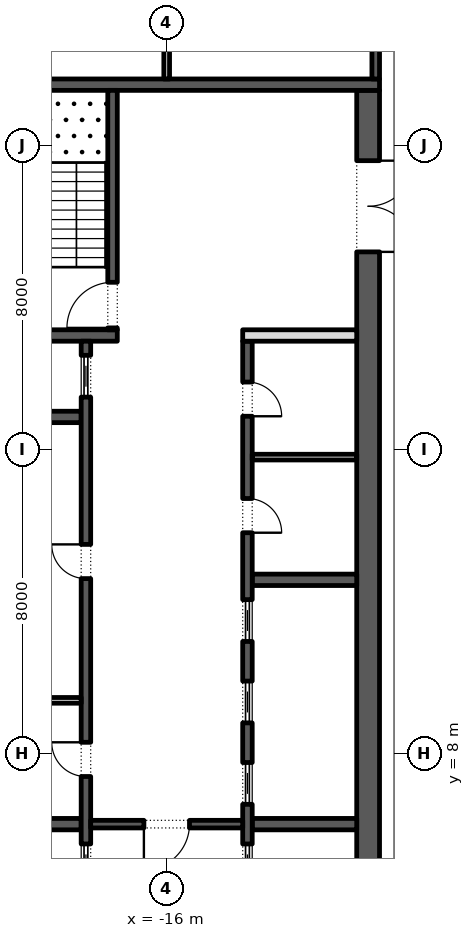
"""IFC4 building model, lengths in metres.
Left out: names, types, materials, properties, quantities, classifications, styles, units other than length and angle.
Written with IfcOpenShell. Run it as: python <this file> out.ifc"""

import sys

from ifc_helpers import new_model, si_unit, direction, frame, frame_2d, origin, place, context, subcontext, project, spatial, rectangle, extrude, element, fill, save


model = new_model("IFC4")
c1 = context("Model", 3, precision=1e-05, world=origin(), true_north=direction((0.0, 1.0)))
c2 = subcontext(c1, "Body", "Model", "MODEL_VIEW")
j1 = project(units=[si_unit("LENGTHUNIT", "METRE"), si_unit("PLANEANGLEUNIT", "RADIAN")], contexts=[c1])
p1 = place(None, origin())
s1 = spatial("IfcSite", under=j1, at=p1, CompositionType="ELEMENT")
p2 = place(p1, origin())
s2 = spatial("IfcBuilding", under=s1, at=p2, CompositionType="ELEMENT")
p3 = place(p2, frame((0.0, 0.0, 268.2)))
s3 = spatial("IfcBuildingStorey", under=s2, at=p3, CompositionType="ELEMENT", Elevation=268.2)
p4 = place(p3, frame((-10.7, -2.45, 0.0), z_axis=(0.0, 0.0, 1.0), x_axis=(0.0, 1.0, 0.0)))
e1 = element("IfcWall", 1, at=p4, inside=s3, PredefinedType="SHEAR", context=c2, shape_type="SweptSolid", body=[
    extrude(rectangle(XDim=27.9, YDim=0.6, at=frame_2d((13.95, 0.0))), origin(), (0.0, 0.0, 1.0), 4.0),
])
p5 = place(p4, frame((23.65, 0.0, 0.0)))
e2 = element("IfcOpeningElement", 2, at=p5, cuts=e1, PredefinedType="OPENING", context=c2, shape_type="SweptSolid", body=[
    extrude(rectangle(XDim=2.4, YDim=2.1, at=frame_2d((1.2, 1.05))), frame((0.0, 0.31, 0.0), z_axis=(0.0, -1.0, 0.0), x_axis=(1.0, 0.0, 0.0)), (0.0, 0.0, 1.0), 0.62),
])
p6 = place(p4, frame((1.087, 0.0, 0.0)))
e3 = element("IfcOpeningElement", 3, at=p6, cuts=e1, PredefinedType="OPENING", context=c2, shape_type="SweptSolid", body=[
    extrude(rectangle(XDim=0.9, YDim=2.1, at=frame_2d((0.45, 1.05))), frame((0.0, 0.31, 0.0), z_axis=(0.0, -1.0, 0.0), x_axis=(1.0, 0.0, 0.0)), (0.0, 0.0, 1.0), 0.62),
])
p7 = place(p4, frame((4.262, 0.0, 0.0)))
e4 = element("IfcOpeningElement", 4, at=p7, cuts=e1, PredefinedType="OPENING", context=c2, shape_type="SweptSolid", body=[
    extrude(rectangle(XDim=1.0, YDim=2.1, at=frame_2d((0.5, 1.05))), frame((0.0, 0.31, 0.0), z_axis=(0.0, -1.0, 0.0), x_axis=(1.0, 0.0, 0.0)), (0.0, 0.0, 1.0), 0.62),
])
p8 = place(p3, frame((-21.6, 25.6, 0.0), z_axis=(0.0, 0.0, 1.0), x_axis=(1.0, 0.0, 0.0)))
e5 = element("IfcWall", 5, at=p8, inside=s3, PredefinedType="SHEAR", context=c2, shape_type="SweptSolid", body=[
    extrude(rectangle(XDim=11.2, YDim=0.3, at=frame_2d((5.6, 0.0))), origin(), (0.0, 0.0, 1.0), 4.0),
])
p9 = place(p3, frame((-21.0, 19.0, 0.0), z_axis=(0.0, 0.0, 1.0), x_axis=(1.0, 0.0, 0.0)))
e6 = element("IfcWall", 6, at=p9, inside=s3, PredefinedType="SHEAR", context=c2, shape_type="SweptSolid", body=[
    extrude(rectangle(XDim=3.7, YDim=0.3, at=frame_2d((1.85, 0.0))), origin(), (0.0, 0.0, 1.0), 4.0),
])
p10 = place(p3, frame((-17.425, 19.15, 0.0), z_axis=(0.0, 0.0, 1.0), x_axis=(0.0, 1.0, 0.0)))
e7 = element("IfcWall", 7, at=p10, inside=s3, PredefinedType="SHEAR", context=c2, shape_type="SweptSolid", body=[
    extrude(rectangle(XDim=6.3, YDim=0.25, at=frame_2d((3.15, 0.0))), origin(), (0.0, 0.0, 1.0), 4.0),
])
p11 = place(p10, frame((0.05, 0.0, 0.0)))
e8 = element("IfcOpeningElement", 8, at=p11, cuts=e7, PredefinedType="OPENING", context=c2, shape_type="SweptSolid", body=[
    extrude(rectangle(XDim=1.2, YDim=2.1, at=frame_2d((0.6, 1.05))), frame((0.0, 0.135, 0.0), z_axis=(0.0, -1.0, 0.0), x_axis=(1.0, 0.0, 0.0)), (0.0, 0.0, 1.0), 0.27),
])
for number, where, z_axis, x_axis in (
    (9, (-21.0, 6.143, 0.0), (0.0, 0.0, 1.0), (1.0, 0.0, 0.0)),
    (10, (-21.0, 16.857, 0.0), (0.0, 0.0, 1.0), (1.0, 0.0, 0.0)),
):
    element("IfcWall", number, at=place(p3, frame(where, z_axis=z_axis, x_axis=x_axis)), inside=s3, PredefinedType="SHEAR", context=c2, shape_type="SweptSolid", body=[
        extrude(rectangle(XDim=2.75, YDim=0.3, at=frame_2d((1.375, 0.0))), origin(), (0.0, 0.0, 1.0), 4.0),
    ])
p12 = place(p3, frame((-18.125, 4.15, 0.0), z_axis=(0.0, 0.0, 1.0), x_axis=(0.0, 1.0, 0.0)))
e11 = element("IfcWall", 11, at=p12, inside=s3, PredefinedType="SHEAR", context=c2, shape_type="SweptSolid", body=[
    extrude(rectangle(XDim=14.7, YDim=0.25, at=frame_2d((7.35, 0.0))), origin(), (0.0, 0.0, 1.0), 4.0),
])
p13 = place(p12, frame((3.246, 0.0, 0.0)))
e12 = element("IfcOpeningElement", 12, at=p13, cuts=e11, PredefinedType="OPENING", context=c2, shape_type="SweptSolid", body=[
    extrude(rectangle(XDim=0.9, YDim=2.1, at=frame_2d((0.45, 1.05))), frame((0.0, 0.135, 0.0), z_axis=(0.0, -1.0, 0.0), x_axis=(1.0, 0.0, 0.0)), (0.0, 0.0, 1.0), 0.27),
])
p14 = place(p12, frame((8.454, 0.0, 0.0)))
e13 = element("IfcOpeningElement", 13, at=p14, cuts=e11, PredefinedType="OPENING", context=c2, shape_type="SweptSolid", body=[
    extrude(rectangle(XDim=0.9, YDim=2.1, at=frame_2d((0.45, 1.05))), frame((0.0, 0.135, 0.0), z_axis=(0.0, -1.0, 0.0), x_axis=(1.0, 0.0, 0.0)), (0.0, 0.0, 1.0), 0.27),
])
p15 = place(p12, frame((0.371, 0.0, 0.0)))
e14 = element("IfcOpeningElement", 14, at=p15, cuts=e11, PredefinedType="OPENING", context=c2, shape_type="SweptSolid", body=[
    extrude(rectangle(XDim=1.1, YDim=2.1, at=frame_2d((0.55, 1.05))), frame((0.0, 0.135, 0.0), z_axis=(0.0, -1.0, 0.0), x_axis=(1.0, 0.0, 0.0)), (0.0, 0.0, 1.0), 0.27),
])
p16 = place(p12, frame((13.229, 0.0, 0.0)))
e15 = element("IfcOpeningElement", 15, at=p16, cuts=e11, PredefinedType="OPENING", context=c2, shape_type="SweptSolid", body=[
    extrude(rectangle(XDim=1.1, YDim=2.1, at=frame_2d((0.55, 1.05))), frame((0.0, 0.135, 0.0), z_axis=(0.0, -1.0, 0.0), x_axis=(1.0, 0.0, 0.0)), (0.0, 0.0, 1.0), 0.27),
])
p17 = place(p3, frame((-21.0, 9.4, 0.0), z_axis=(0.0, 0.0, 1.0), x_axis=(1.0, 0.0, 0.0)))
e16 = element("IfcWall", 16, at=p17, inside=s3, PredefinedType="PARTITIONING", context=c2, shape_type="SweptSolid", body=[
    extrude(rectangle(XDim=2.75, YDim=0.15, at=frame_2d((1.375, 0.0))), origin(), (0.0, 0.0, 1.0), 4.0),
])
for number, where, z_axis, x_axis in (
    (17, (-13.75, 6.143, 0.0), (0.0, 0.0, 1.0), (1.0, 0.0, 0.0)),
    (18, (-13.75, 12.571, 0.0), (0.0, 0.0, 1.0), (1.0, 0.0, 0.0)),
):
    element("IfcWall", number, at=place(p3, frame(where, z_axis=z_axis, x_axis=x_axis)), inside=s3, PredefinedType="SHEAR", context=c2, shape_type="SweptSolid", body=[
        extrude(rectangle(XDim=2.75, YDim=0.3, at=frame_2d((1.375, 0.0))), origin(), (0.0, 0.0, 1.0), 4.0),
    ])
p18 = place(p3, frame((-13.875, -2.45, 0.0), z_axis=(0.0, 0.0, 1.0), x_axis=(0.0, 1.0, 0.0)))
e19 = element("IfcWall", 19, at=p18, inside=s3, PredefinedType="SHEAR", context=c2, shape_type="SweptSolid", body=[
    extrude(rectangle(XDim=21.3, YDim=0.25, at=frame_2d((10.65, 0.0))), origin(), (0.0, 0.0, 1.0), 4.0),
])
p19 = place(p18, frame((16.261, 0.0, 0.0)))
e20 = element("IfcOpeningElement", 20, at=p19, cuts=e19, PredefinedType="OPENING", context=c2, shape_type="SweptSolid", body=[
    extrude(rectangle(XDim=0.9, YDim=2.1, at=frame_2d((0.45, 1.05))), frame((0.0, 0.135, 0.0), z_axis=(0.0, -1.0, 0.0), x_axis=(1.0, 0.0, 0.0)), (0.0, 0.0, 1.0), 0.27),
])
p20 = place(p18, frame((19.325, 0.0, 0.0)))
e21 = element("IfcOpeningElement", 21, at=p20, cuts=e19, PredefinedType="OPENING", context=c2, shape_type="SweptSolid", body=[
    extrude(rectangle(XDim=0.9, YDim=2.1, at=frame_2d((0.45, 1.05))), frame((0.0, 0.135, 0.0), z_axis=(0.0, -1.0, 0.0), x_axis=(1.0, 0.0, 0.0)), (0.0, 0.0, 1.0), 0.27),
])
p21 = place(p18, frame((6.971, 0.0, 0.0)))
e22 = element("IfcOpeningElement", 22, at=p21, cuts=e19, PredefinedType="OPENING", context=c2, shape_type="SweptSolid", body=[
    extrude(rectangle(XDim=1.1, YDim=2.1, at=frame_2d((0.55, 1.05))), frame((0.0, 0.135, 0.0), z_axis=(0.0, -1.0, 0.0), x_axis=(1.0, 0.0, 0.0)), (0.0, 0.0, 1.0), 0.27),
])
p22 = place(p18, frame((9.114, 0.0, 0.0)))
e23 = element("IfcOpeningElement", 23, at=p22, cuts=e19, PredefinedType="OPENING", context=c2, shape_type="SweptSolid", body=[
    extrude(rectangle(XDim=1.1, YDim=2.1, at=frame_2d((0.55, 1.05))), frame((0.0, 0.135, 0.0), z_axis=(0.0, -1.0, 0.0), x_axis=(1.0, 0.0, 0.0)), (0.0, 0.0, 1.0), 0.27),
])
p23 = place(p18, frame((11.257, 0.0, 0.0)))
e24 = element("IfcOpeningElement", 24, at=p23, cuts=e19, PredefinedType="OPENING", context=c2, shape_type="SweptSolid", body=[
    extrude(rectangle(XDim=1.1, YDim=2.1, at=frame_2d((0.55, 1.05))), frame((0.0, 0.135, 0.0), z_axis=(0.0, -1.0, 0.0), x_axis=(1.0, 0.0, 0.0)), (0.0, 0.0, 1.0), 0.27),
])
p24 = place(p18, frame((13.4, 0.0, 0.0)))
e25 = element("IfcOpeningElement", 25, at=p24, cuts=e19, PredefinedType="OPENING", context=c2, shape_type="SweptSolid", body=[
    extrude(rectangle(XDim=1.1, YDim=2.1, at=frame_2d((0.55, 1.05))), frame((0.0, 0.135, 0.0), z_axis=(0.0, -1.0, 0.0), x_axis=(1.0, 0.0, 0.0)), (0.0, 0.0, 1.0), 0.27),
])
p25 = place(p3, frame((-14.0, 19.0, 0.0), z_axis=(0.0, 0.0, 1.0), x_axis=(1.0, 0.0, 0.0)))
e26 = element("IfcWall", 26, at=p25, inside=s3, PredefinedType="PARTITIONING", context=c2, shape_type="SweptSolid", body=[
    extrude(rectangle(XDim=3.0, YDim=0.3, at=frame_2d((1.5, 0.0))), origin(), (0.0, 0.0, 1.0), 4.0),
])
p26 = place(p3, frame((-13.75, 15.8, 0.0), z_axis=(0.0, 0.0, 1.0), x_axis=(1.0, 0.0, 0.0)))
e27 = element("IfcWall", 27, at=p26, inside=s3, PredefinedType="PARTITIONING", context=c2, shape_type="SweptSolid", body=[
    extrude(rectangle(XDim=2.75, YDim=0.15, at=frame_2d((1.375, 0.0))), origin(), (0.0, 0.0, 1.0), 4.0),
])
p27 = place(p3, frame((-18.0, 6.143, 0.0), z_axis=(0.0, 0.0, 1.0), x_axis=(1.0, 0.0, 0.0)))
e28 = element("IfcWall", 28, at=p27, inside=s3, PredefinedType="SHEAR", context=c2, shape_type="SweptSolid", body=[
    extrude(rectangle(XDim=4.0, YDim=0.2, at=frame_2d((2.0, 0.0))), origin(), (0.0, 0.0, 1.0), 4.0),
])
p28 = place(p27, frame((1.4, 0.0, 0.0)))
e29 = element("IfcOpeningElement", 29, at=p28, cuts=e28, PredefinedType="OPENING", context=c2, shape_type="SweptSolid", body=[
    extrude(rectangle(XDim=1.2, YDim=2.1, at=frame_2d((0.6, 1.05))), frame((0.0, 0.11, 0.0), z_axis=(0.0, -1.0, 0.0), x_axis=(1.0, 0.0, 0.0)), (0.0, 0.0, 1.0), 0.22),
])
p29 = place(p3, frame((-10.5, 25.75, 0.0), z_axis=(0.0, 0.0, 1.0), x_axis=(0.0, 1.0, 0.0)))
e30 = element("IfcWall", 30, at=p29, inside=s3, PredefinedType="SHEAR", context=c2, shape_type="SweptSolid", body=[
    extrude(rectangle(XDim=4.75, YDim=0.2, at=frame_2d((2.375, 0.0))), origin(), (0.0, 0.0, 1.0), 4.0),
])
p30 = place(p29, frame((1.925, 0.0, 0.0)))
e31 = element("IfcOpeningElement", 31, at=p30, cuts=e30, PredefinedType="OPENING", context=c2, shape_type="SweptSolid", body=[
    extrude(rectangle(XDim=0.9, YDim=2.1, at=frame_2d((0.45, 1.05))), frame((0.0, 0.11, 0.0), z_axis=(0.0, -1.0, 0.0), x_axis=(1.0, 0.0, 0.0)), (0.0, 0.0, 1.0), 0.22),
])
p31 = place(p3, frame((-16.0, 25.75, 0.0), z_axis=(0.0, 0.0, 1.0), x_axis=(0.0, 1.0, 0.0)))
e32 = element("IfcWall", 32, at=p31, inside=s3, PredefinedType="PARTITIONING", context=c2, shape_type="SweptSolid", body=[
    extrude(rectangle(XDim=4.75, YDim=0.15, at=frame_2d((2.375, 0.0))), origin(), (0.0, 0.0, 1.0), 4.0),
])
p32 = place(p13, origin())
e33 = element("IfcDoor", 33, at=p32, inside=s3, OperationType="SINGLE_SWING_LEFT", PredefinedType="DOOR", context=c2, shape_type="SweptSolid", body=[
    extrude(rectangle(XDim=0.9, YDim=2.1, at=frame_2d((0.45, 1.05))), frame((0.0, 0.125, 0.0), z_axis=(0.0, -1.0, 0.0), x_axis=(1.0, 0.0, 0.0)), (0.0, 0.0, 1.0), 0.05),
])
fill(e12, e33)
p33 = place(p14, origin())
e34 = element("IfcDoor", 34, at=p33, inside=s3, OperationType="SINGLE_SWING_LEFT", PredefinedType="DOOR", context=c2, shape_type="SweptSolid", body=[
    extrude(rectangle(XDim=0.9, YDim=2.1, at=frame_2d((0.45, 1.05))), frame((0.0, 0.125, 0.0), z_axis=(0.0, -1.0, 0.0), x_axis=(1.0, 0.0, 0.0)), (0.0, 0.0, 1.0), 0.05),
])
fill(e13, e34)
p34 = place(p15, origin())
e35 = element("IfcDoor", 35, at=p34, inside=s3, OperationType="SLIDING_TO_LEFT", PredefinedType="DOOR", context=c2, shape_type="SweptSolid", body=[
    extrude(rectangle(XDim=1.1, YDim=2.1, at=frame_2d((0.55, 1.05))), frame((0.0, 0.025, 0.0), z_axis=(0.0, -1.0, 0.0), x_axis=(1.0, 0.0, 0.0)), (0.0, 0.0, 1.0), 0.05),
])
fill(e14, e35)
p35 = place(p16, origin())
e36 = element("IfcDoor", 36, at=p35, inside=s3, OperationType="SLIDING_TO_LEFT", PredefinedType="DOOR", context=c2, shape_type="SweptSolid", body=[
    extrude(rectangle(XDim=1.1, YDim=2.1, at=frame_2d((0.55, 1.05))), frame((0.0, 0.025, 0.0), z_axis=(0.0, -1.0, 0.0), x_axis=(1.0, 0.0, 0.0)), (0.0, 0.0, 1.0), 0.05),
])
fill(e15, e36)
p36 = place(p19, frame((0.9, -0.2, 0.0), z_axis=(0.0, 0.0, 1.0), x_axis=(-1.0, 0.0, 0.0)))
e37 = element("IfcDoor", 37, at=p36, inside=s3, OperationType="SINGLE_SWING_LEFT", PredefinedType="DOOR", context=c2, shape_type="SweptSolid", body=[
    extrude(rectangle(XDim=0.9, YDim=2.1, at=frame_2d((0.45, 1.05))), frame((0.0, -0.075, 0.0), z_axis=(0.0, -1.0, 0.0), x_axis=(1.0, 0.0, 0.0)), (0.0, 0.0, 1.0), 0.05),
])
fill(e20, e37)
p37 = place(p20, frame((0.9, -0.2, 0.0), z_axis=(0.0, 0.0, 1.0), x_axis=(-1.0, 0.0, 0.0)))
e38 = element("IfcDoor", 38, at=p37, inside=s3, OperationType="SINGLE_SWING_LEFT", PredefinedType="DOOR", context=c2, shape_type="SweptSolid", body=[
    extrude(rectangle(XDim=0.9, YDim=2.1, at=frame_2d((0.45, 1.05))), frame((0.0, -0.075, 0.0), z_axis=(0.0, -1.0, 0.0), x_axis=(1.0, 0.0, 0.0)), (0.0, 0.0, 1.0), 0.05),
])
fill(e21, e38)
p38 = place(p21, origin())
e39 = element("IfcDoor", 39, at=p38, inside=s3, OperationType="SLIDING_TO_LEFT", PredefinedType="DOOR", context=c2, shape_type="SweptSolid", body=[
    extrude(rectangle(XDim=1.1, YDim=2.1, at=frame_2d((0.55, 1.05))), frame((0.0, 0.025, 0.0), z_axis=(0.0, -1.0, 0.0), x_axis=(1.0, 0.0, 0.0)), (0.0, 0.0, 1.0), 0.05),
])
fill(e22, e39)
p39 = place(p22, origin())
e40 = element("IfcDoor", 40, at=p39, inside=s3, OperationType="SLIDING_TO_LEFT", PredefinedType="DOOR", context=c2, shape_type="SweptSolid", body=[
    extrude(rectangle(XDim=1.1, YDim=2.1, at=frame_2d((0.55, 1.05))), frame((0.0, 0.025, 0.0), z_axis=(0.0, -1.0, 0.0), x_axis=(1.0, 0.0, 0.0)), (0.0, 0.0, 1.0), 0.05),
])
fill(e23, e40)
p40 = place(p23, origin())
e41 = element("IfcDoor", 41, at=p40, inside=s3, OperationType="SLIDING_TO_LEFT", PredefinedType="DOOR", context=c2, shape_type="SweptSolid", body=[
    extrude(rectangle(XDim=1.1, YDim=2.1, at=frame_2d((0.55, 1.05))), frame((0.0, 0.025, 0.0), z_axis=(0.0, -1.0, 0.0), x_axis=(1.0, 0.0, 0.0)), (0.0, 0.0, 1.0), 0.05),
])
fill(e24, e41)
p41 = place(p24, origin())
e42 = element("IfcDoor", 42, at=p41, inside=s3, OperationType="SLIDING_TO_LEFT", PredefinedType="DOOR", context=c2, shape_type="SweptSolid", body=[
    extrude(rectangle(XDim=1.1, YDim=2.1, at=frame_2d((0.55, 1.05))), frame((0.0, 0.025, 0.0), z_axis=(0.0, -1.0, 0.0), x_axis=(1.0, 0.0, 0.0)), (0.0, 0.0, 1.0), 0.05),
])
fill(e25, e42)
p42 = place(p28, frame((1.2, 0.0, 0.0), z_axis=(0.0, 0.0, 1.0), x_axis=(-1.0, 0.0, 0.0)))
e43 = element("IfcDoor", 43, at=p42, inside=s3, OperationType="SINGLE_SWING_LEFT", PredefinedType="DOOR", context=c2, shape_type="SweptSolid", body=[
    extrude(rectangle(XDim=1.2, YDim=2.1, at=frame_2d((0.6, 1.05))), frame((0.0, 0.025, 0.0), z_axis=(0.0, -1.0, 0.0), x_axis=(1.0, 0.0, 0.0)), (0.0, 0.0, 1.0), 0.05),
])
fill(e29, e43)
p43 = place(p5, frame((2.4, 0.0, 0.0), z_axis=(0.0, 0.0, 1.0), x_axis=(-1.0, 0.0, 0.0)))
e44 = element("IfcDoor", 44, at=p43, inside=s3, OperationType="DOUBLE_DOOR_SINGLE_SWING", PredefinedType="DOOR", context=c2, shape_type="SweptSolid", body=[
    extrude(rectangle(XDim=2.4, YDim=2.1, at=frame_2d((1.2, 1.05))), frame((0.0, 0.025, 0.0), z_axis=(0.0, -1.0, 0.0), x_axis=(1.0, 0.0, 0.0)), (0.0, 0.0, 1.0), 0.05),
])
fill(e2, e44)
p44 = place(p11, origin())
e45 = element("IfcDoor", 45, at=p44, inside=s3, OperationType="SINGLE_SWING_RIGHT", PredefinedType="DOOR", context=c2, shape_type="SweptSolid", body=[
    extrude(rectangle(XDim=1.2, YDim=2.1, at=frame_2d((0.6, 1.05))), frame((0.0, 0.025, 0.0), z_axis=(0.0, -1.0, 0.0), x_axis=(1.0, 0.0, 0.0)), (0.0, 0.0, 1.0), 0.05),
])
fill(e8, e45)
save(model, sys.argv[1])
